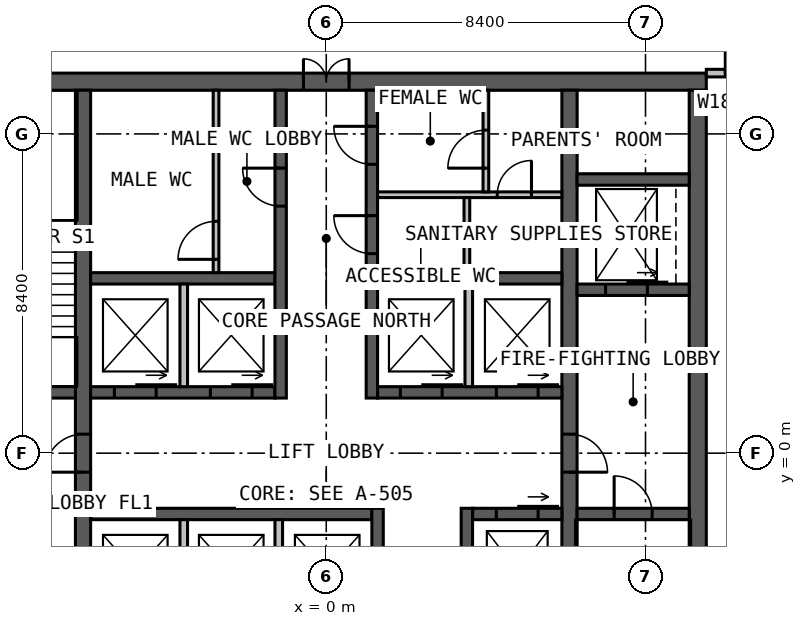
"""IFC4 building model, lengths in metres.
Left out: names, types, materials, properties, quantities, classifications, styles, units other than length and angle.
Written with IfcOpenShell. Run it as: python <this file> out.ifc"""

import sys

from ifc_helpers import new_model, si_unit, direction, frame, frame_2d, origin, place, context, subcontext, project, spatial, rectangle, extrude, element, fill, save


model = new_model("IFC4")
c1 = context("Model", 3, precision=1e-05, world=origin(), true_north=direction((0.0, 1.0)))
c2 = subcontext(c1, "Body", "Model", "MODEL_VIEW")
j1 = project(units=[si_unit("LENGTHUNIT", "METRE"), si_unit("PLANEANGLEUNIT", "RADIAN")], contexts=[c1])
p1 = place(None, origin())
s1 = spatial("IfcSite", under=j1, at=p1, CompositionType="ELEMENT")
p2 = place(p1, origin())
s2 = spatial("IfcBuilding", under=s1, at=p2, CompositionType="ELEMENT")
p3 = place(p2, frame((0.0, 0.0, 171.0)))
s3 = spatial("IfcBuildingStorey", under=s2, at=p3, CompositionType="ELEMENT", Elevation=171.0)
p4 = place(p3, frame((-10.0, 9.775, 0.0), z_axis=(0.0, 0.0, 1.0), x_axis=(1.0, 0.0, 0.0)))
e1 = element("IfcWall", 1, at=p4, inside=s3, PredefinedType="SOLIDWALL", context=c2, shape_type="SweptSolid", body=[
    extrude(rectangle(XDim=20.0, YDim=0.45, at=frame_2d((10.0, 0.0))), origin(), (0.0, 0.0, 1.0), 4.0),
])
p5 = place(p4, frame((9.4, 0.0, 0.0)))
e2 = element("IfcOpeningElement", 2, at=p5, cuts=e1, PredefinedType="OPENING", context=c2, shape_type="SweptSolid", body=[
    extrude(rectangle(XDim=1.2, YDim=2.2, at=frame_2d((0.6, 1.1))), frame((0.0, 0.235, 0.0), z_axis=(0.0, -1.0, 0.0), x_axis=(1.0, 0.0, 0.0)), (0.0, 0.0, 1.0), 0.47),
])
p6 = place(p3, frame((9.775, -9.55, 0.0), z_axis=(0.0, 0.0, 1.0), x_axis=(0.0, 1.0, 0.0)))
e3 = element("IfcWall", 3, at=p6, inside=s3, PredefinedType="SOLIDWALL", context=c2, shape_type="SweptSolid", body=[
    extrude(rectangle(XDim=19.1, YDim=0.45, at=frame_2d((9.55, 0.0))), origin(), (0.0, 0.0, 1.0), 4.0),
])
p7 = place(p3, frame((-6.4, -9.55, 0.0), z_axis=(0.0, 0.0, 1.0), x_axis=(0.0, 1.0, 0.0)))
e4 = element("IfcWall", 4, at=p7, inside=s3, PredefinedType="SOLIDWALL", context=c2, shape_type="SweptSolid", body=[
    extrude(rectangle(XDim=19.1, YDim=0.4, at=frame_2d((9.55, 0.0))), origin(), (0.0, 0.0, 1.0), 4.0),
])
p8 = place(p7, frame((9.05, 0.0, 0.0)))
e5 = element("IfcOpeningElement", 5, at=p8, cuts=e4, PredefinedType="OPENING", context=c2, shape_type="SweptSolid", body=[
    extrude(rectangle(XDim=1.0, YDim=2.2, at=frame_2d((0.5, 1.1))), frame((0.0, 0.21, 0.0), z_axis=(0.0, -1.0, 0.0), x_axis=(1.0, 0.0, 0.0)), (0.0, 0.0, 1.0), 0.42),
])
p9 = place(p3, frame((6.4, 9.55, 0.0), z_axis=(0.0, 0.0, 1.0), x_axis=(0.0, -1.0, 0.0)))
e6 = element("IfcWall", 6, at=p9, inside=s3, PredefinedType="SOLIDWALL", context=c2, shape_type="SweptSolid", body=[
    extrude(rectangle(XDim=19.1, YDim=0.4, at=frame_2d((9.55, 0.0))), origin(), (0.0, 0.0, 1.0), 4.0),
])
p10 = place(p9, frame((9.05, 0.0, 0.0)))
e7 = element("IfcOpeningElement", 7, at=p10, cuts=e6, PredefinedType="OPENING", context=c2, shape_type="SweptSolid", body=[
    extrude(rectangle(XDim=1.0, YDim=2.2, at=frame_2d((0.5, 1.1))), frame((0.0, 0.21, 0.0), z_axis=(0.0, -1.0, 0.0), x_axis=(1.0, 0.0, 0.0)), (0.0, 0.0, 1.0), 0.42),
])
p11 = place(p3, frame((-6.2, 1.6, 0.0), z_axis=(0.0, 0.0, 1.0), x_axis=(1.0, 0.0, 0.0)))
e8 = element("IfcWall", 8, at=p11, inside=s3, PredefinedType="SOLIDWALL", context=c2, shape_type="SweptSolid", body=[
    extrude(rectangle(XDim=4.85, YDim=0.3, at=frame_2d((2.425, 0.0))), origin(), (0.0, 0.0, 1.0), 4.0),
])
p12 = place(p11, frame((0.625, 0.0, 0.0)))
e9 = element("IfcOpeningElement", 9, at=p12, cuts=e8, PredefinedType="OPENING", context=c2, shape_type="SweptSolid", body=[
    extrude(rectangle(XDim=1.1, YDim=2.2, at=frame_2d((0.55, 1.1))), frame((0.0, 0.16, 0.0), z_axis=(0.0, -1.0, 0.0), x_axis=(1.0, 0.0, 0.0)), (0.0, 0.0, 1.0), 0.32),
])
p13 = place(p11, frame((3.15, 0.0, 0.0)))
e10 = element("IfcOpeningElement", 10, at=p13, cuts=e8, PredefinedType="OPENING", context=c2, shape_type="SweptSolid", body=[
    extrude(rectangle(XDim=1.1, YDim=2.2, at=frame_2d((0.55, 1.1))), frame((0.0, 0.16, 0.0), z_axis=(0.0, -1.0, 0.0), x_axis=(1.0, 0.0, 0.0)), (0.0, 0.0, 1.0), 0.32),
])
p14 = place(p3, frame((1.35, 1.6, 0.0), z_axis=(0.0, 0.0, 1.0), x_axis=(1.0, 0.0, 0.0)))
e11 = element("IfcWall", 11, at=p14, inside=s3, PredefinedType="SOLIDWALL", context=c2, shape_type="SweptSolid", body=[
    extrude(rectangle(XDim=4.85, YDim=0.3, at=frame_2d((2.425, 0.0))), origin(), (0.0, 0.0, 1.0), 4.0),
])
p15 = place(p14, frame((0.6, 0.0, 0.0)))
e12 = element("IfcOpeningElement", 12, at=p15, cuts=e11, PredefinedType="OPENING", context=c2, shape_type="SweptSolid", body=[
    extrude(rectangle(XDim=1.1, YDim=2.2, at=frame_2d((0.55, 1.1))), frame((0.0, 0.16, 0.0), z_axis=(0.0, -1.0, 0.0), x_axis=(1.0, 0.0, 0.0)), (0.0, 0.0, 1.0), 0.32),
])
p16 = place(p14, frame((3.125, 0.0, 0.0)))
e13 = element("IfcOpeningElement", 13, at=p16, cuts=e11, PredefinedType="OPENING", context=c2, shape_type="SweptSolid", body=[
    extrude(rectangle(XDim=1.1, YDim=2.2, at=frame_2d((0.55, 1.1))), frame((0.0, 0.16, 0.0), z_axis=(0.0, -1.0, 0.0), x_axis=(1.0, 0.0, 0.0)), (0.0, 0.0, 1.0), 0.32),
])
for number, where, z_axis, x_axis in (
    (14, (-6.2, 4.6, 0.0), (0.0, 0.0, 1.0), (1.0, 0.0, 0.0)),
    (15, (1.35, 4.6, 0.0), (0.0, 0.0, 1.0), (1.0, 0.0, 0.0)),
):
    element("IfcWall", number, at=place(p3, frame(where, z_axis=z_axis, x_axis=x_axis)), inside=s3, PredefinedType="SOLIDWALL", context=c2, shape_type="SweptSolid", body=[
        extrude(rectangle(XDim=4.85, YDim=0.3, at=frame_2d((2.425, 0.0))), origin(), (0.0, 0.0, 1.0), 4.0),
    ])
p17 = place(p3, frame((-1.2, 1.45, 0.0), z_axis=(0.0, 0.0, 1.0), x_axis=(0.0, 1.0, 0.0)))
e16 = element("IfcWall", 16, at=p17, inside=s3, PredefinedType="SOLIDWALL", context=c2, shape_type="SweptSolid", body=[
    extrude(rectangle(XDim=8.1, YDim=0.3, at=frame_2d((4.05, 0.0))), origin(), (0.0, 0.0, 1.0), 4.0),
])
p18 = place(p17, frame((5.05, 0.0, 0.0)))
e17 = element("IfcOpeningElement", 17, at=p18, cuts=e16, PredefinedType="OPENING", context=c2, shape_type="SweptSolid", body=[
    extrude(rectangle(XDim=1.0, YDim=2.2, at=frame_2d((0.5, 1.1))), frame((0.0, 0.16, 0.0), z_axis=(0.0, -1.0, 0.0), x_axis=(1.0, 0.0, 0.0)), (0.0, 0.0, 1.0), 0.32),
])
p19 = place(p3, frame((1.2, 1.45, 0.0), z_axis=(0.0, 0.0, 1.0), x_axis=(0.0, 1.0, 0.0)))
e18 = element("IfcWall", 18, at=p19, inside=s3, PredefinedType="SOLIDWALL", context=c2, shape_type="SweptSolid", body=[
    extrude(rectangle(XDim=8.1, YDim=0.3, at=frame_2d((4.05, 0.0))), origin(), (0.0, 0.0, 1.0), 4.0),
])
p20 = place(p19, frame((3.8, 0.0, 0.0)))
e19 = element("IfcOpeningElement", 19, at=p20, cuts=e18, PredefinedType="OPENING", context=c2, shape_type="SweptSolid", body=[
    extrude(rectangle(XDim=1.0, YDim=2.2, at=frame_2d((0.5, 1.1))), frame((0.0, 0.16, 0.0), z_axis=(0.0, -1.0, 0.0), x_axis=(1.0, 0.0, 0.0)), (0.0, 0.0, 1.0), 0.32),
])
p21 = place(p19, frame((6.15, 0.0, 0.0)))
e20 = element("IfcOpeningElement", 20, at=p21, cuts=e18, PredefinedType="OPENING", context=c2, shape_type="SweptSolid", body=[
    extrude(rectangle(XDim=1.0, YDim=2.2, at=frame_2d((0.5, 1.1))), frame((0.0, 0.16, 0.0), z_axis=(0.0, -1.0, 0.0), x_axis=(1.0, 0.0, 0.0)), (0.0, 0.0, 1.0), 0.32),
])
p22 = place(p3, frame((-6.2, -1.6, 0.0), z_axis=(0.0, 0.0, 1.0), x_axis=(1.0, 0.0, 0.0)))
e21 = element("IfcWall", 21, at=p22, inside=s3, PredefinedType="SOLIDWALL", context=c2, shape_type="SweptSolid", body=[
    extrude(rectangle(XDim=7.4, YDim=0.3, at=frame_2d((3.7, 0.0))), origin(), (0.0, 0.0, 1.0), 4.0),
])
p23 = place(p3, frame((3.85, -1.6, 0.0), z_axis=(0.0, 0.0, 1.0), x_axis=(1.0, 0.0, 0.0)))
e22 = element("IfcWall", 22, at=p23, inside=s3, PredefinedType="SOLIDWALL", context=c2, shape_type="SweptSolid", body=[
    extrude(rectangle(XDim=2.35, YDim=0.3, at=frame_2d((1.175, 0.0))), origin(), (0.0, 0.0, 1.0), 4.0),
])
p24 = place(p23, frame((0.625, 0.0, 0.0)))
e23 = element("IfcOpeningElement", 23, at=p24, cuts=e22, PredefinedType="OPENING", context=c2, shape_type="SweptSolid", body=[
    extrude(rectangle(XDim=1.1, YDim=2.2, at=frame_2d((0.55, 1.1))), frame((0.0, 0.16, 0.0), z_axis=(0.0, -1.0, 0.0), x_axis=(1.0, 0.0, 0.0)), (0.0, 0.0, 1.0), 0.32),
])
p25 = place(p3, frame((1.35, -1.45, 0.0), z_axis=(0.0, 0.0, 1.0), x_axis=(0.0, -1.0, 0.0)))
e24 = element("IfcWall", 24, at=p25, inside=s3, PredefinedType="SOLIDWALL", context=c2, shape_type="SweptSolid", body=[
    extrude(rectangle(XDim=8.1, YDim=0.3, at=frame_2d((4.05, 0.0))), origin(), (0.0, 0.0, 1.0), 4.0),
])
p26 = place(p25, frame((5.975, 0.0, 0.0)))
e25 = element("IfcOpeningElement", 25, at=p26, cuts=e24, PredefinedType="OPENING", context=c2, shape_type="SweptSolid", body=[
    extrude(rectangle(XDim=1.0, YDim=2.2, at=frame_2d((0.5, 1.1))), frame((0.0, 0.16, 0.0), z_axis=(0.0, -1.0, 0.0), x_axis=(1.0, 0.0, 0.0)), (0.0, 0.0, 1.0), 0.32),
])
p27 = place(p25, frame((3.525, 0.0, 0.0)))
e26 = element("IfcOpeningElement", 26, at=p27, cuts=e24, PredefinedType="OPENING", context=c2, shape_type="SweptSolid", body=[
    extrude(rectangle(XDim=0.9, YDim=2.2, at=frame_2d((0.45, 1.1))), frame((0.0, 0.16, 0.0), z_axis=(0.0, -1.0, 0.0), x_axis=(1.0, 0.0, 0.0)), (0.0, 0.0, 1.0), 0.32),
])
p28 = place(p3, frame((3.7, -1.45, 0.0), z_axis=(0.0, 0.0, 1.0), x_axis=(0.0, -1.0, 0.0)))
e27 = element("IfcWall", 27, at=p28, inside=s3, PredefinedType="SOLIDWALL", context=c2, shape_type="SweptSolid", body=[
    extrude(rectangle(XDim=8.1, YDim=0.3, at=frame_2d((4.05, 0.0))), origin(), (0.0, 0.0, 1.0), 4.0),
])
p29 = place(p28, frame((5.1, 0.0, 0.0)))
e28 = element("IfcOpeningElement", 28, at=p29, cuts=e27, PredefinedType="OPENING", context=c2, shape_type="SweptSolid", body=[
    extrude(rectangle(XDim=0.9, YDim=2.2, at=frame_2d((0.45, 1.1))), frame((0.0, 0.16, 0.0), z_axis=(0.0, -1.0, 0.0), x_axis=(1.0, 0.0, 0.0)), (0.0, 0.0, 1.0), 0.32),
])
p30 = place(p3, frame((-9.55, 1.6, 0.0), z_axis=(0.0, 0.0, 1.0), x_axis=(1.0, 0.0, 0.0)))
e29 = element("IfcWall", 29, at=p30, inside=s3, PredefinedType="SOLIDWALL", context=c2, shape_type="SweptSolid", body=[
    extrude(rectangle(XDim=2.95, YDim=0.3, at=frame_2d((1.475, 0.0))), origin(), (0.0, 0.0, 1.0), 4.0),
])
p31 = place(p30, frame((0.975, 0.0, 0.0)))
e30 = element("IfcOpeningElement", 30, at=p31, cuts=e29, PredefinedType="OPENING", context=c2, shape_type="SweptSolid", body=[
    extrude(rectangle(XDim=1.0, YDim=2.2, at=frame_2d((0.5, 1.1))), frame((0.0, 0.16, 0.0), z_axis=(0.0, -1.0, 0.0), x_axis=(1.0, 0.0, 0.0)), (0.0, 0.0, 1.0), 0.32),
])
p32 = place(p3, frame((6.6, -1.6, 0.0), z_axis=(0.0, 0.0, 1.0), x_axis=(1.0, 0.0, 0.0)))
e31 = element("IfcWall", 31, at=p32, inside=s3, PredefinedType="SOLIDWALL", context=c2, shape_type="SweptSolid", body=[
    extrude(rectangle(XDim=2.95, YDim=0.3, at=frame_2d((1.475, 0.0))), origin(), (0.0, 0.0, 1.0), 4.0),
])
p33 = place(p32, frame((0.975, 0.0, 0.0)))
e32 = element("IfcOpeningElement", 32, at=p33, cuts=e31, PredefinedType="OPENING", context=c2, shape_type="SweptSolid", body=[
    extrude(rectangle(XDim=1.0, YDim=2.2, at=frame_2d((0.5, 1.1))), frame((0.0, 0.16, 0.0), z_axis=(0.0, -1.0, 0.0), x_axis=(1.0, 0.0, 0.0)), (0.0, 0.0, 1.0), 0.32),
])
p34 = place(p3, frame((6.6, 4.3, 0.0), z_axis=(0.0, 0.0, 1.0), x_axis=(1.0, 0.0, 0.0)))
e33 = element("IfcWall", 33, at=p34, inside=s3, PredefinedType="SOLIDWALL", context=c2, shape_type="SweptSolid", body=[
    extrude(rectangle(XDim=2.95, YDim=0.3, at=frame_2d((1.475, 0.0))), origin(), (0.0, 0.0, 1.0), 4.0),
])
p35 = place(p34, frame((0.75, 0.0, 0.0)))
e34 = element("IfcOpeningElement", 34, at=p35, cuts=e33, PredefinedType="OPENING", context=c2, shape_type="SweptSolid", body=[
    extrude(rectangle(XDim=1.1, YDim=2.2, at=frame_2d((0.55, 1.1))), frame((0.0, 0.16, 0.0), z_axis=(0.0, -1.0, 0.0), x_axis=(1.0, 0.0, 0.0)), (0.0, 0.0, 1.0), 0.32),
])
p36 = place(p3, frame((6.6, 7.2, 0.0), z_axis=(0.0, 0.0, 1.0), x_axis=(1.0, 0.0, 0.0)))
e35 = element("IfcWall", 35, at=p36, inside=s3, PredefinedType="SOLIDWALL", context=c2, shape_type="SweptSolid", body=[
    extrude(rectangle(XDim=2.95, YDim=0.3, at=frame_2d((1.475, 0.0))), origin(), (0.0, 0.0, 1.0), 4.0),
])
for number, where, z_axis, x_axis in (
    (36, (-3.75, 1.75, 0.0), (0.0, 0.0, 1.0), (0.0, 1.0, 0.0)),
    (37, (3.75, 1.75, 0.0), (0.0, 0.0, 1.0), (0.0, 1.0, 0.0)),
    (38, (-3.75, -1.75, 0.0), (0.0, 0.0, 1.0), (0.0, -1.0, 0.0)),
    (39, (-1.25, -1.75, 0.0), (0.0, 0.0, 1.0), (0.0, -1.0, 0.0)),
):
    element("IfcWall", number, at=place(p3, frame(where, z_axis=z_axis, x_axis=x_axis)), inside=s3, PredefinedType="SOLIDWALL", context=c2, shape_type="SweptSolid", body=[
        extrude(rectangle(XDim=2.7, YDim=0.2, at=frame_2d((1.35, 0.0))), origin(), (0.0, 0.0, 1.0), 3.75),
    ])
p37 = place(p3, frame((1.35, 6.8, 0.0), z_axis=(0.0, 0.0, 1.0), x_axis=(1.0, 0.0, 0.0)))
e40 = element("IfcWall", 40, at=p37, inside=s3, PredefinedType="PARTITIONING", context=c2, shape_type="SweptSolid", body=[
    extrude(rectangle(XDim=4.85, YDim=0.15, at=frame_2d((2.425, 0.0))), origin(), (0.0, 0.0, 1.0), 3.75),
])
p38 = place(p37, frame((3.15, 0.0, 0.0)))
e41 = element("IfcOpeningElement", 41, at=p38, cuts=e40, PredefinedType="OPENING", context=c2, shape_type="SweptSolid", body=[
    extrude(rectangle(XDim=0.9, YDim=2.2, at=frame_2d((0.45, 1.1))), frame((0.0, 0.085, 0.0), z_axis=(0.0, -1.0, 0.0), x_axis=(1.0, 0.0, 0.0)), (0.0, 0.0, 1.0), 0.17),
])
p39 = place(p3, frame((3.7, 4.75, 0.0), z_axis=(0.0, 0.0, 1.0), x_axis=(0.0, 1.0, 0.0)))
e42 = element("IfcWall", 42, at=p39, inside=s3, PredefinedType="PARTITIONING", context=c2, shape_type="SweptSolid", body=[
    extrude(rectangle(XDim=1.975, YDim=0.15, at=frame_2d((0.988, 0.0))), origin(), (0.0, 0.0, 1.0), 3.75),
])
p40 = place(p3, frame((4.2, 6.875, 0.0), z_axis=(0.0, 0.0, 1.0), x_axis=(0.0, 1.0, 0.0)))
e43 = element("IfcWall", 43, at=p40, inside=s3, PredefinedType="PARTITIONING", context=c2, shape_type="SweptSolid", body=[
    extrude(rectangle(XDim=2.675, YDim=0.15, at=frame_2d((1.337, 0.0))), origin(), (0.0, 0.0, 1.0), 3.75),
])
p41 = place(p40, frame((0.625, 0.0, 0.0)))
e44 = element("IfcOpeningElement", 44, at=p41, cuts=e43, PredefinedType="OPENING", context=c2, shape_type="SweptSolid", body=[
    extrude(rectangle(XDim=1.0, YDim=2.2, at=frame_2d((0.5, 1.1))), frame((0.0, 0.085, 0.0), z_axis=(0.0, -1.0, 0.0), x_axis=(1.0, 0.0, 0.0)), (0.0, 0.0, 1.0), 0.17),
])
p42 = place(p3, frame((-2.9, 4.75, 0.0), z_axis=(0.0, 0.0, 1.0), x_axis=(0.0, 1.0, 0.0)))
e45 = element("IfcWall", 45, at=p42, inside=s3, PredefinedType="PARTITIONING", context=c2, shape_type="SweptSolid", body=[
    extrude(rectangle(XDim=4.8, YDim=0.15, at=frame_2d((2.4, 0.0))), origin(), (0.0, 0.0, 1.0), 3.75),
])
p43 = place(p42, frame((0.35, 0.0, 0.0)))
e46 = element("IfcOpeningElement", 46, at=p43, cuts=e45, PredefinedType="OPENING", context=c2, shape_type="SweptSolid", body=[
    extrude(rectangle(XDim=1.0, YDim=2.2, at=frame_2d((0.5, 1.1))), frame((0.0, 0.085, 0.0), z_axis=(0.0, -1.0, 0.0), x_axis=(1.0, 0.0, 0.0)), (0.0, 0.0, 1.0), 0.17),
])
p44 = place(p3, frame((10.0, 10.0, 0.0), z_axis=(0.0, 0.0, 1.0), x_axis=(1.0, 0.0, 0.0)))
e47 = element("IfcWall", 47, at=p44, inside=s3, PredefinedType="PARTITIONING", context=c2, shape_type="SweptSolid", body=[
    extrude(rectangle(XDim=2.0, YDim=0.2, at=frame_2d((1.0, 0.0))), origin(), (0.0, 0.0, 1.0), 3.8),
])
p45 = place(p44, frame((0.5, 0.0, 0.0)))
e48 = element("IfcOpeningElement", 48, at=p45, cuts=e47, PredefinedType="OPENING", context=c2, shape_type="SweptSolid", body=[
    extrude(rectangle(XDim=1.0, YDim=2.2, at=frame_2d((0.5, 1.1))), frame((0.0, 0.11, 0.0), z_axis=(0.0, -1.0, 0.0), x_axis=(1.0, 0.0, 0.0)), (0.0, 0.0, 1.0), 0.22),
])
p46 = place(p5, origin())
e49 = element("IfcDoor", 49, at=p46, inside=s3, OperationType="DOUBLE_DOOR_SINGLE_SWING", PredefinedType="DOOR", context=c2, shape_type="SweptSolid", body=[
    extrude(rectangle(XDim=1.2, YDim=2.2, at=frame_2d((0.6, 1.1))), frame((0.0, 0.025, 0.0), z_axis=(0.0, -1.0, 0.0), x_axis=(1.0, 0.0, 0.0)), (0.0, 0.0, 1.0), 0.05),
])
fill(e2, e49)
p47 = place(p8, origin())
e50 = element("IfcDoor", 50, at=p47, inside=s3, OperationType="SINGLE_SWING_LEFT", PredefinedType="DOOR", context=c2, shape_type="SweptSolid", body=[
    extrude(rectangle(XDim=1.0, YDim=2.2, at=frame_2d((0.5, 1.1))), frame((0.0, 0.025, 0.0), z_axis=(0.0, -1.0, 0.0), x_axis=(1.0, 0.0, 0.0)), (0.0, 0.0, 1.0), 0.05),
])
fill(e5, e50)
p48 = place(p10, origin())
e51 = element("IfcDoor", 51, at=p48, inside=s3, OperationType="SINGLE_SWING_RIGHT", PredefinedType="DOOR", context=c2, shape_type="SweptSolid", body=[
    extrude(rectangle(XDim=1.0, YDim=2.2, at=frame_2d((0.5, 1.1))), frame((0.0, 0.025, 0.0), z_axis=(0.0, -1.0, 0.0), x_axis=(1.0, 0.0, 0.0)), (0.0, 0.0, 1.0), 0.05),
])
fill(e7, e51)
p49 = place(p33, origin())
e52 = element("IfcDoor", 52, at=p49, inside=s3, OperationType="SINGLE_SWING_LEFT", PredefinedType="DOOR", context=c2, shape_type="SweptSolid", body=[
    extrude(rectangle(XDim=1.0, YDim=2.2, at=frame_2d((0.5, 1.1))), frame((0.0, 0.025, 0.0), z_axis=(0.0, -1.0, 0.0), x_axis=(1.0, 0.0, 0.0)), (0.0, 0.0, 1.0), 0.05),
])
fill(e32, e52)
p50 = place(p18, origin())
e53 = element("IfcDoor", 53, at=p50, inside=s3, OperationType="SINGLE_SWING_RIGHT", PredefinedType="DOOR", context=c2, shape_type="SweptSolid", body=[
    extrude(rectangle(XDim=1.0, YDim=2.2, at=frame_2d((0.5, 1.1))), frame((0.0, 0.025, 0.0), z_axis=(0.0, -1.0, 0.0), x_axis=(1.0, 0.0, 0.0)), (0.0, 0.0, 1.0), 0.05),
])
fill(e17, e53)
p51 = place(p20, origin())
e54 = element("IfcDoor", 54, at=p51, inside=s3, OperationType="SINGLE_SWING_RIGHT", PredefinedType="DOOR", context=c2, shape_type="SweptSolid", body=[
    extrude(rectangle(XDim=1.0, YDim=2.2, at=frame_2d((0.5, 1.1))), frame((0.0, 0.025, 0.0), z_axis=(0.0, -1.0, 0.0), x_axis=(1.0, 0.0, 0.0)), (0.0, 0.0, 1.0), 0.05),
])
fill(e19, e54)
p52 = place(p21, origin())
e55 = element("IfcDoor", 55, at=p52, inside=s3, OperationType="SINGLE_SWING_RIGHT", PredefinedType="DOOR", context=c2, shape_type="SweptSolid", body=[
    extrude(rectangle(XDim=1.0, YDim=2.2, at=frame_2d((0.5, 1.1))), frame((0.0, 0.025, 0.0), z_axis=(0.0, -1.0, 0.0), x_axis=(1.0, 0.0, 0.0)), (0.0, 0.0, 1.0), 0.05),
])
fill(e20, e55)
p53 = place(p38, origin())
e56 = element("IfcDoor", 56, at=p53, inside=s3, OperationType="SINGLE_SWING_RIGHT", PredefinedType="DOOR", context=c2, shape_type="SweptSolid", body=[
    extrude(rectangle(XDim=0.9, YDim=2.2, at=frame_2d((0.45, 1.1))), frame((0.0, 0.025, 0.0), z_axis=(0.0, -1.0, 0.0), x_axis=(1.0, 0.0, 0.0)), (0.0, 0.0, 1.0), 0.05),
])
fill(e41, e56)
p54 = place(p41, origin())
e57 = element("IfcDoor", 57, at=p54, inside=s3, OperationType="SINGLE_SWING_LEFT", PredefinedType="DOOR", context=c2, shape_type="SweptSolid", body=[
    extrude(rectangle(XDim=1.0, YDim=2.2, at=frame_2d((0.5, 1.1))), frame((0.0, 0.025, 0.0), z_axis=(0.0, -1.0, 0.0), x_axis=(1.0, 0.0, 0.0)), (0.0, 0.0, 1.0), 0.05),
])
fill(e44, e57)
p55 = place(p43, origin())
e58 = element("IfcDoor", 58, at=p55, inside=s3, OperationType="SINGLE_SWING_LEFT", PredefinedType="DOOR", context=c2, shape_type="SweptSolid", body=[
    extrude(rectangle(XDim=1.0, YDim=2.2, at=frame_2d((0.5, 1.1))), frame((0.0, 0.025, 0.0), z_axis=(0.0, -1.0, 0.0), x_axis=(1.0, 0.0, 0.0)), (0.0, 0.0, 1.0), 0.05),
])
fill(e46, e58)
p56 = place(p12, origin())
e59 = element("IfcDoor", 59, at=p56, inside=s3, OperationType="SLIDING_TO_LEFT", PredefinedType="DOOR", context=c2, shape_type="SweptSolid", body=[
    extrude(rectangle(XDim=1.1, YDim=2.2, at=frame_2d((0.55, 1.1))), frame((0.0, 0.025, 0.0), z_axis=(0.0, -1.0, 0.0), x_axis=(1.0, 0.0, 0.0)), (0.0, 0.0, 1.0), 0.05),
])
fill(e9, e59)
p57 = place(p13, origin())
e60 = element("IfcDoor", 60, at=p57, inside=s3, OperationType="SLIDING_TO_LEFT", PredefinedType="DOOR", context=c2, shape_type="SweptSolid", body=[
    extrude(rectangle(XDim=1.1, YDim=2.2, at=frame_2d((0.55, 1.1))), frame((0.0, 0.025, 0.0), z_axis=(0.0, -1.0, 0.0), x_axis=(1.0, 0.0, 0.0)), (0.0, 0.0, 1.0), 0.05),
])
fill(e10, e60)
p58 = place(p15, origin())
e61 = element("IfcDoor", 61, at=p58, inside=s3, OperationType="SLIDING_TO_LEFT", PredefinedType="DOOR", context=c2, shape_type="SweptSolid", body=[
    extrude(rectangle(XDim=1.1, YDim=2.2, at=frame_2d((0.55, 1.1))), frame((0.0, 0.025, 0.0), z_axis=(0.0, -1.0, 0.0), x_axis=(1.0, 0.0, 0.0)), (0.0, 0.0, 1.0), 0.05),
])
fill(e12, e61)
p59 = place(p16, origin())
e62 = element("IfcDoor", 62, at=p59, inside=s3, OperationType="SLIDING_TO_LEFT", PredefinedType="DOOR", context=c2, shape_type="SweptSolid", body=[
    extrude(rectangle(XDim=1.1, YDim=2.2, at=frame_2d((0.55, 1.1))), frame((0.0, 0.025, 0.0), z_axis=(0.0, -1.0, 0.0), x_axis=(1.0, 0.0, 0.0)), (0.0, 0.0, 1.0), 0.05),
])
fill(e13, e62)
p60 = place(p24, origin())
e63 = element("IfcDoor", 63, at=p60, inside=s3, OperationType="SLIDING_TO_LEFT", PredefinedType="DOOR", context=c2, shape_type="SweptSolid", body=[
    extrude(rectangle(XDim=1.1, YDim=2.2, at=frame_2d((0.55, 1.1))), frame((0.0, 0.025, 0.0), z_axis=(0.0, -1.0, 0.0), x_axis=(1.0, 0.0, 0.0)), (0.0, 0.0, 1.0), 0.05),
])
fill(e23, e63)
p61 = place(p35, origin())
e64 = element("IfcDoor", 64, at=p61, inside=s3, OperationType="SLIDING_TO_LEFT", PredefinedType="DOOR", context=c2, shape_type="SweptSolid", body=[
    extrude(rectangle(XDim=1.1, YDim=2.2, at=frame_2d((0.55, 1.1))), frame((0.0, 0.025, 0.0), z_axis=(0.0, -1.0, 0.0), x_axis=(1.0, 0.0, 0.0)), (0.0, 0.0, 1.0), 0.05),
])
fill(e34, e64)
p62 = place(p45, origin())
e65 = element("IfcDoor", 65, at=p62, inside=s3, OperationType="SINGLE_SWING_LEFT", PredefinedType="DOOR", context=c2, shape_type="SweptSolid", body=[
    extrude(rectangle(XDim=1.0, YDim=2.2, at=frame_2d((0.5, 1.1))), frame((0.0, 0.025, 0.0), z_axis=(0.0, -1.0, 0.0), x_axis=(1.0, 0.0, 0.0)), (0.0, 0.0, 1.0), 0.05),
])
fill(e48, e65)
save(model, sys.argv[1])
